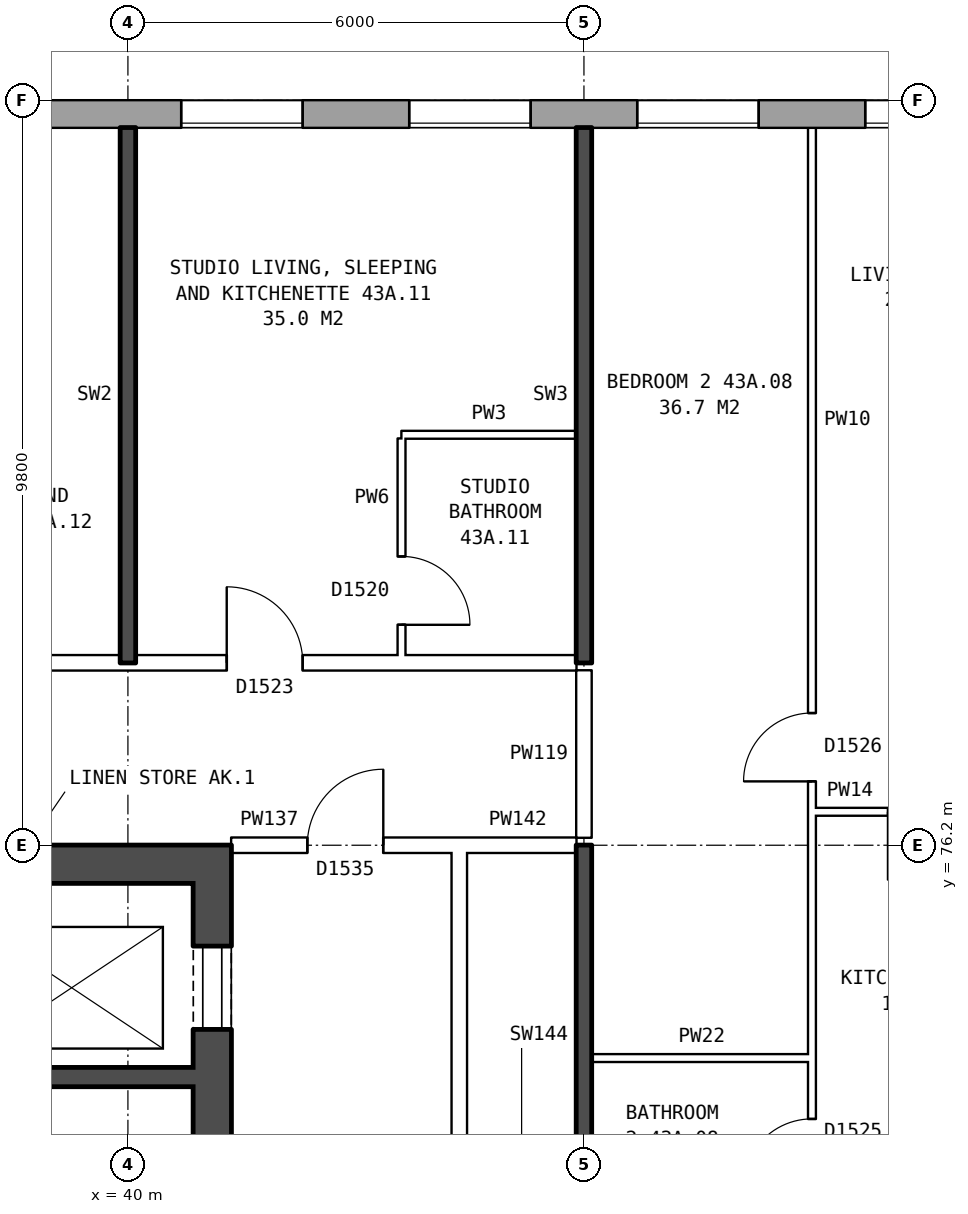
"""IFC4 building model, lengths in metres.
Left out: names, types, materials, properties, quantities, classifications, styles, units other than length and angle.
Written with IfcOpenShell. Run it as: python <this file> out.ifc"""

import sys

from ifc_helpers import new_model, si_unit, direction, frame, frame_2d, origin, place, context, subcontext, project, spatial, rectangle, extrude, element, fill, save


model = new_model("IFC4")
c1 = context("Model", 3, precision=1e-05, world=origin(), true_north=direction((0.0, 1.0)))
c2 = subcontext(c1, "Body", "Model", "MODEL_VIEW")
j1 = project(units=[si_unit("LENGTHUNIT", "METRE"), si_unit("PLANEANGLEUNIT", "RADIAN")], contexts=[c1])
p1 = place(None, origin())
s1 = spatial("IfcSite", under=j1, at=p1, CompositionType="ELEMENT")
p2 = place(p1, origin())
s2 = spatial("IfcBuilding", under=s1, at=p2, CompositionType="ELEMENT")
p3 = place(p2, frame((0.0, 0.0, 154.7)))
s3 = spatial("IfcBuildingStorey", under=s2, at=p3, CompositionType="ELEMENT", Elevation=154.7)
p4 = place(p3, frame((72.925, 85.82, 0.0), z_axis=(0.0, 0.0, 1.0), x_axis=(-1.0, 0.0, 0.0)))
e1 = element("IfcWall", 1, at=p4, inside=s3, PredefinedType="STANDARD", context=c2, shape_type="SweptSolid", body=[
    extrude(rectangle(XDim=41.351, YDim=0.36, at=frame_2d((20.675, 0.0))), origin(), (0.0, 0.0, 1.0), 2.85),
])
p5 = place(p4, frame((0.625, 0.0, 0.8)))
e2 = element("IfcOpeningElement", 2, at=p5, cuts=e1, PredefinedType="OPENING", context=c2, shape_type="SweptSolid", body=[
    extrude(rectangle(XDim=1.6, YDim=1.8, at=frame_2d((0.8, 0.9))), frame((0.0, 0.19, 0.0), z_axis=(0.0, -1.0, 0.0), x_axis=(1.0, 0.0, 0.0)), (0.0, 0.0, 1.0), 0.38),
])
p6 = place(p4, frame((3.625, 0.0, 0.8)))
e3 = element("IfcOpeningElement", 3, at=p6, cuts=e1, PredefinedType="OPENING", context=c2, shape_type="SweptSolid", body=[
    extrude(rectangle(XDim=1.6, YDim=1.8, at=frame_2d((0.8, 0.9))), frame((0.0, 0.19, 0.0), z_axis=(0.0, -1.0, 0.0), x_axis=(1.0, 0.0, 0.0)), (0.0, 0.0, 1.0), 0.38),
])
p7 = place(p4, frame((5.525, 0.0, 1.7)))
e4 = element("IfcOpeningElement", 4, at=p7, cuts=e1, PredefinedType="OPENING", context=c2, shape_type="SweptSolid", body=[
    extrude(rectangle(XDim=1.4, YDim=0.9, at=frame_2d((0.7, 0.45))), frame((0.0, 0.19, 0.0), z_axis=(0.0, -1.0, 0.0), x_axis=(1.0, 0.0, 0.0)), (0.0, 0.0, 1.0), 0.38),
])
p8 = place(p4, frame((9.625, 0.0, 0.8)))
e5 = element("IfcOpeningElement", 5, at=p8, cuts=e1, PredefinedType="OPENING", context=c2, shape_type="SweptSolid", body=[
    extrude(rectangle(XDim=1.6, YDim=1.8, at=frame_2d((0.8, 0.9))), frame((0.0, 0.19, 0.0), z_axis=(0.0, -1.0, 0.0), x_axis=(1.0, 0.0, 0.0)), (0.0, 0.0, 1.0), 0.38),
])
p9 = place(p4, frame((12.625, 0.0, 0.8)))
e6 = element("IfcOpeningElement", 6, at=p9, cuts=e1, PredefinedType="OPENING", context=c2, shape_type="SweptSolid", body=[
    extrude(rectangle(XDim=1.6, YDim=1.8, at=frame_2d((0.8, 0.9))), frame((0.0, 0.19, 0.0), z_axis=(0.0, -1.0, 0.0), x_axis=(1.0, 0.0, 0.0)), (0.0, 0.0, 1.0), 0.38),
])
p10 = place(p4, frame((15.625, 0.0, 0.8)))
e7 = element("IfcOpeningElement", 7, at=p10, cuts=e1, PredefinedType="OPENING", context=c2, shape_type="SweptSolid", body=[
    extrude(rectangle(XDim=1.6, YDim=1.8, at=frame_2d((0.8, 0.9))), frame((0.0, 0.19, 0.0), z_axis=(0.0, -1.0, 0.0), x_axis=(1.0, 0.0, 0.0)), (0.0, 0.0, 1.0), 0.38),
])
p11 = place(p4, frame((18.625, 0.0, 0.8)))
e8 = element("IfcOpeningElement", 8, at=p11, cuts=e1, PredefinedType="OPENING", context=c2, shape_type="SweptSolid", body=[
    extrude(rectangle(XDim=1.6, YDim=1.8, at=frame_2d((0.8, 0.9))), frame((0.0, 0.19, 0.0), z_axis=(0.0, -1.0, 0.0), x_axis=(1.0, 0.0, 0.0)), (0.0, 0.0, 1.0), 0.38),
])
p12 = place(p4, frame((21.625, 0.0, 0.8)))
e9 = element("IfcOpeningElement", 9, at=p12, cuts=e1, PredefinedType="OPENING", context=c2, shape_type="SweptSolid", body=[
    extrude(rectangle(XDim=1.6, YDim=1.8, at=frame_2d((0.8, 0.9))), frame((0.0, 0.19, 0.0), z_axis=(0.0, -1.0, 0.0), x_axis=(1.0, 0.0, 0.0)), (0.0, 0.0, 1.0), 0.38),
])
p13 = place(p4, frame((24.625, 0.0, 0.8)))
e10 = element("IfcOpeningElement", 10, at=p13, cuts=e1, PredefinedType="OPENING", context=c2, shape_type="SweptSolid", body=[
    extrude(rectangle(XDim=1.6, YDim=1.8, at=frame_2d((0.8, 0.9))), frame((0.0, 0.19, 0.0), z_axis=(0.0, -1.0, 0.0), x_axis=(1.0, 0.0, 0.0)), (0.0, 0.0, 1.0), 0.38),
])
p14 = place(p4, frame((27.625, 0.0, 0.8)))
e11 = element("IfcOpeningElement", 11, at=p14, cuts=e1, PredefinedType="OPENING", context=c2, shape_type="SweptSolid", body=[
    extrude(rectangle(XDim=1.6, YDim=1.8, at=frame_2d((0.8, 0.9))), frame((0.0, 0.19, 0.0), z_axis=(0.0, -1.0, 0.0), x_axis=(1.0, 0.0, 0.0)), (0.0, 0.0, 1.0), 0.38),
])
p15 = place(p4, frame((30.625, 0.0, 0.8)))
e12 = element("IfcOpeningElement", 12, at=p15, cuts=e1, PredefinedType="OPENING", context=c2, shape_type="SweptSolid", body=[
    extrude(rectangle(XDim=1.6, YDim=1.8, at=frame_2d((0.8, 0.9))), frame((0.0, 0.19, 0.0), z_axis=(0.0, -1.0, 0.0), x_axis=(1.0, 0.0, 0.0)), (0.0, 0.0, 1.0), 0.38),
])
p16 = place(p4, frame((34.425, 0.0, 1.7)))
e13 = element("IfcOpeningElement", 13, at=p16, cuts=e1, PredefinedType="OPENING", context=c2, shape_type="SweptSolid", body=[
    extrude(rectangle(XDim=0.6, YDim=0.9, at=frame_2d((0.3, 0.45))), frame((0.0, 0.19, 0.0), z_axis=(0.0, -1.0, 0.0), x_axis=(1.0, 0.0, 0.0)), (0.0, 0.0, 1.0), 0.38),
])
p17 = place(p4, frame((36.625, 0.0, 0.8)))
e14 = element("IfcOpeningElement", 14, at=p17, cuts=e1, PredefinedType="OPENING", context=c2, shape_type="SweptSolid", body=[
    extrude(rectangle(XDim=1.6, YDim=1.8, at=frame_2d((0.8, 0.9))), frame((0.0, 0.19, 0.0), z_axis=(0.0, -1.0, 0.0), x_axis=(1.0, 0.0, 0.0)), (0.0, 0.0, 1.0), 0.38),
])
p18 = place(p4, frame((35.325, 0.0, 1.0)))
e15 = element("IfcOpeningElement", 15, at=p18, cuts=e1, PredefinedType="OPENING", context=c2, shape_type="SweptSolid", body=[
    extrude(rectangle(XDim=1.0, YDim=1.5, at=frame_2d((0.5, 0.75))), frame((0.0, 0.19, 0.0), z_axis=(0.0, -1.0, 0.0), x_axis=(1.0, 0.0, 0.0)), (0.0, 0.0, 1.0), 0.38),
])
p19 = place(p3, frame((41.11, 76.2, 0.0), z_axis=(0.0, 0.0, 1.0), x_axis=(0.0, -1.0, 0.0)))
e16 = element("IfcWall", 16, at=p19, inside=s3, PredefinedType="SHEAR", context=c2, shape_type="SweptSolid", body=[
    extrude(rectangle(XDim=12.4, YDim=0.5, at=frame_2d((6.2, 0.0))), origin(), (0.0, 0.0, 1.0), 2.85),
])
p20 = place(p19, frame((1.325, 0.0, 0.0)))
e17 = element("IfcOpeningElement", 17, at=p20, cuts=e16, PredefinedType="OPENING", context=c2, shape_type="SweptSolid", body=[
    extrude(rectangle(XDim=1.1, YDim=2.1, at=frame_2d((0.55, 1.05))), frame((0.0, 0.26, 0.0), z_axis=(0.0, -1.0, 0.0), x_axis=(1.0, 0.0, 0.0)), (0.0, 0.0, 1.0), 0.52),
])
p21 = place(p19, frame((4.225, 0.0, 0.0)))
e18 = element("IfcOpeningElement", 18, at=p21, cuts=e16, PredefinedType="OPENING", context=c2, shape_type="SweptSolid", body=[
    extrude(rectangle(XDim=0.85, YDim=2.1, at=frame_2d((0.425, 1.05))), frame((0.0, 0.26, 0.0), z_axis=(0.0, -1.0, 0.0), x_axis=(1.0, 0.0, 0.0)), (0.0, 0.0, 1.0), 0.52),
])
p22 = place(p19, frame((7.475, 0.0, 0.0)))
e19 = element("IfcOpeningElement", 19, at=p22, cuts=e16, PredefinedType="OPENING", context=c2, shape_type="SweptSolid", body=[
    extrude(rectangle(XDim=0.85, YDim=2.1, at=frame_2d((0.425, 1.05))), frame((0.0, 0.26, 0.0), z_axis=(0.0, -1.0, 0.0), x_axis=(1.0, 0.0, 0.0)), (0.0, 0.0, 1.0), 0.52),
])
p23 = place(p19, frame((9.9, 0.0, 0.0)))
e20 = element("IfcOpeningElement", 20, at=p23, cuts=e16, PredefinedType="OPENING", context=c2, shape_type="SweptSolid", body=[
    extrude(rectangle(XDim=1.1, YDim=2.1, at=frame_2d((0.55, 1.05))), frame((0.0, 0.26, 0.0), z_axis=(0.0, -1.0, 0.0), x_axis=(1.0, 0.0, 0.0)), (0.0, 0.0, 1.0), 0.52),
])
p24 = place(p3, frame((40.86, 75.95, 0.0), z_axis=(0.0, 0.0, 1.0), x_axis=(-1.0, 0.0, 0.0)))
e21 = element("IfcWall", 21, at=p24, inside=s3, PredefinedType="SHEAR", context=c2, shape_type="SweptSolid", body=[
    extrude(rectangle(XDim=8.0, YDim=0.5, at=frame_2d((4.0, 0.0))), origin(), (0.0, 0.0, 1.0), 2.85),
])
p25 = place(p3, frame((40.86, 73.15, 0.0), z_axis=(0.0, 0.0, 1.0), x_axis=(-1.0, 0.0, 0.0)))
e22 = element("IfcWall", 22, at=p25, inside=s3, PredefinedType="SHEAR", context=c2, shape_type="SweptSolid", body=[
    extrude(rectangle(XDim=3.495, YDim=0.25, at=frame_2d((1.748, 0.0))), origin(), (0.0, 0.0, 1.0), 2.85),
])
p26 = place(p3, frame((44.36, 63.9, 0.0), z_axis=(0.0, 0.0, 1.0), x_axis=(0.0, 1.0, 0.0)))
e23 = element("IfcWall", 23, at=p26, inside=s3, PredefinedType="PARTITIONING", context=c2, shape_type="SweptSolid", body=[
    extrude(rectangle(XDim=12.2, YDim=0.2, at=frame_2d((6.1, 0.0))), origin(), (0.0, 0.0, 1.0), 2.85),
])
p27 = place(p26, frame((5.1, 0.0, 0.0)))
e24 = element("IfcOpeningElement", 24, at=p27, cuts=e23, PredefinedType="OPENING", context=c2, shape_type="SweptSolid", body=[
    extrude(rectangle(XDim=2.0, YDim=2.1, at=frame_2d((1.0, 1.05))), frame((0.0, 0.11, 0.0), z_axis=(0.0, -1.0, 0.0), x_axis=(1.0, 0.0, 0.0)), (0.0, 0.0, 1.0), 0.22),
])
p28 = place(p3, frame((46.1, 73.4, 0.0), z_axis=(0.0, 0.0, 1.0), x_axis=(1.0, 0.0, 0.0)))
e25 = element("IfcWall", 25, at=p28, inside=s3, PredefinedType="PARTITIONING", context=c2, shape_type="SweptSolid", body=[
    extrude(rectangle(XDim=2.9, YDim=0.1, at=frame_2d((1.45, 0.0))), origin(), (0.0, 0.0, 1.0), 2.85),
])
p29 = place(p3, frame((41.36, 76.2, 0.0), z_axis=(0.0, 0.0, 1.0), x_axis=(1.0, 0.0, 0.0)))
e26 = element("IfcWall", 26, at=p29, inside=s3, PredefinedType="PARTITIONING", context=c2, shape_type="SweptSolid", body=[
    extrude(rectangle(XDim=3.0, YDim=0.2, at=frame_2d((1.5, 0.0))), origin(), (0.0, 0.0, 1.0), 2.85),
])
p30 = place(p29, frame((1.0, 0.0, 0.0)))
e27 = element("IfcOpeningElement", 27, at=p30, cuts=e26, PredefinedType="OPENING", context=c2, shape_type="SweptSolid", body=[
    extrude(rectangle(XDim=1.0, YDim=2.1, at=frame_2d((0.5, 1.05))), frame((0.0, 0.11, 0.0), z_axis=(0.0, -1.0, 0.0), x_axis=(1.0, 0.0, 0.0)), (0.0, 0.0, 1.0), 0.22),
])
p31 = place(p3, frame((44.36, 76.2, 0.0), z_axis=(0.0, 0.0, 1.0), x_axis=(1.0, 0.0, 0.0)))
e28 = element("IfcWall", 28, at=p31, inside=s3, PredefinedType="PARTITIONING", context=c2, shape_type="SweptSolid", body=[
    extrude(rectangle(XDim=1.54, YDim=0.2, at=frame_2d((0.77, 0.0))), origin(), (0.0, 0.0, 1.0), 2.85),
])
p32 = place(p3, frame((49.0, 76.64, 0.0), z_axis=(0.0, 0.0, 1.0), x_axis=(1.0, 0.0, 0.0)))
e29 = element("IfcWall", 29, at=p32, inside=s3, PredefinedType="PARTITIONING", context=c2, shape_type="SweptSolid", body=[
    extrude(rectangle(XDim=2.9, YDim=0.1, at=frame_2d((1.45, 0.0))), origin(), (0.0, 0.0, 1.0), 2.85),
])
p33 = place(p32, frame((1.0, 0.0, 0.0)))
e30 = element("IfcOpeningElement", 30, at=p33, cuts=e29, PredefinedType="OPENING", context=c2, shape_type="SweptSolid", body=[
    extrude(rectangle(XDim=0.9, YDim=2.1, at=frame_2d((0.45, 1.05))), frame((0.0, 0.06, 0.0), z_axis=(0.0, -1.0, 0.0), x_axis=(1.0, 0.0, 0.0)), (0.0, 0.0, 1.0), 0.12),
])
p34 = place(p3, frame((28.86, 78.6, 0.0), z_axis=(0.0, 0.0, 1.0), x_axis=(1.0, 0.0, 0.0)))
e31 = element("IfcWall", 31, at=p34, inside=s3, PredefinedType="PARTITIONING", context=c2, shape_type="SweptSolid", body=[
    extrude(rectangle(XDim=17.04, YDim=0.2, at=frame_2d((8.52, 0.0))), origin(), (0.0, 0.0, 1.0), 2.85),
])
p35 = place(p34, frame((12.44, 0.0, 0.0)))
e32 = element("IfcOpeningElement", 32, at=p35, cuts=e31, PredefinedType="OPENING", context=c2, shape_type="SweptSolid", body=[
    extrude(rectangle(XDim=1.0, YDim=2.1, at=frame_2d((0.5, 1.05))), frame((0.0, 0.11, 0.0), z_axis=(0.0, -1.0, 0.0), x_axis=(1.0, 0.0, 0.0)), (0.0, 0.0, 1.0), 0.22),
])
p36 = place(p34, frame((7.64, 0.0, 0.0)))
e33 = element("IfcOpeningElement", 33, at=p36, cuts=e31, PredefinedType="OPENING", context=c2, shape_type="SweptSolid", body=[
    extrude(rectangle(XDim=1.0, YDim=2.1, at=frame_2d((0.5, 1.05))), frame((0.0, 0.11, 0.0), z_axis=(0.0, -1.0, 0.0), x_axis=(1.0, 0.0, 0.0)), (0.0, 0.0, 1.0), 0.22),
])
p37 = place(p3, frame((43.6, 81.6, 0.0), z_axis=(0.0, 0.0, 1.0), x_axis=(1.0, 0.0, 0.0)))
e34 = element("IfcWall", 34, at=p37, inside=s3, PredefinedType="PARTITIONING", context=c2, shape_type="SweptSolid", body=[
    extrude(rectangle(XDim=2.3, YDim=0.1, at=frame_2d((1.15, 0.0))), origin(), (0.0, 0.0, 1.0), 2.85),
])
p38 = place(p3, frame((40.0, 78.6, 0.0), z_axis=(0.0, 0.0, 1.0), x_axis=(0.0, 1.0, 0.0)))
e35 = element("IfcWall", 35, at=p38, inside=s3, PredefinedType="SOLIDWALL", context=c2, shape_type="SweptSolid", body=[
    extrude(rectangle(XDim=7.04, YDim=0.2, at=frame_2d((3.52, 0.0))), origin(), (0.0, 0.0, 1.0), 2.85),
])
p39 = place(p3, frame((43.6, 78.7, 0.0), z_axis=(0.0, 0.0, 1.0), x_axis=(0.0, 1.0, 0.0)))
e36 = element("IfcWall", 36, at=p39, inside=s3, PredefinedType="PARTITIONING", context=c2, shape_type="SweptSolid", body=[
    extrude(rectangle(XDim=2.85, YDim=0.1, at=frame_2d((1.425, 0.0))), origin(), (0.0, 0.0, 1.0), 2.85),
])
p40 = place(p39, frame((0.4, 0.0, 0.0)))
e37 = element("IfcOpeningElement", 37, at=p40, cuts=e36, PredefinedType="OPENING", context=c2, shape_type="SweptSolid", body=[
    extrude(rectangle(XDim=0.9, YDim=2.1, at=frame_2d((0.45, 1.05))), frame((0.0, 0.06, 0.0), z_axis=(0.0, -1.0, 0.0), x_axis=(1.0, 0.0, 0.0)), (0.0, 0.0, 1.0), 0.12),
])
p41 = place(p3, frame((46.0, 71.2, 0.0), z_axis=(0.0, 0.0, 1.0), x_axis=(0.0, 1.0, 0.0)))
e38 = element("IfcWall", 38, at=p41, inside=s3, PredefinedType="SOLIDWALL", context=c2, shape_type="SweptSolid", body=[
    extrude(rectangle(XDim=5.0, YDim=0.2, at=frame_2d((2.5, 0.0))), origin(), (0.0, 0.0, 1.0), 2.85),
])
p42 = place(p3, frame((46.0, 76.3, 0.0), z_axis=(0.0, 0.0, 1.0), x_axis=(0.0, 1.0, 0.0)))
e39 = element("IfcWall", 39, at=p42, inside=s3, PredefinedType="PARTITIONING", context=c2, shape_type="SweptSolid", body=[
    extrude(rectangle(XDim=2.2, YDim=0.2, at=frame_2d((1.1, 0.0))), origin(), (0.0, 0.0, 1.0), 2.85),
])
p43 = place(p3, frame((46.0, 78.6, 0.0), z_axis=(0.0, 0.0, 1.0), x_axis=(0.0, 1.0, 0.0)))
e40 = element("IfcWall", 40, at=p43, inside=s3, PredefinedType="SOLIDWALL", context=c2, shape_type="SweptSolid", body=[
    extrude(rectangle(XDim=7.04, YDim=0.2, at=frame_2d((3.52, 0.0))), origin(), (0.0, 0.0, 1.0), 2.85),
])
p44 = place(p3, frame((49.0, 71.3, 0.0), z_axis=(0.0, 0.0, 1.0), x_axis=(0.0, 1.0, 0.0)))
e41 = element("IfcWall", 41, at=p44, inside=s3, PredefinedType="PARTITIONING", context=c2, shape_type="SweptSolid", body=[
    extrude(rectangle(XDim=14.34, YDim=0.1, at=frame_2d((7.17, 0.0))), origin(), (0.0, 0.0, 1.0), 2.85),
])
p45 = place(p44, frame((5.74, 0.0, 0.0)))
e42 = element("IfcOpeningElement", 42, at=p45, cuts=e41, PredefinedType="OPENING", context=c2, shape_type="SweptSolid", body=[
    extrude(rectangle(XDim=0.9, YDim=2.1, at=frame_2d((0.45, 1.05))), frame((0.0, 0.06, 0.0), z_axis=(0.0, -1.0, 0.0), x_axis=(1.0, 0.0, 0.0)), (0.0, 0.0, 1.0), 0.12),
])
p46 = place(p44, frame((0.4, 0.0, 0.0)))
e43 = element("IfcOpeningElement", 43, at=p46, cuts=e41, PredefinedType="OPENING", context=c2, shape_type="SweptSolid", body=[
    extrude(rectangle(XDim=0.9, YDim=2.1, at=frame_2d((0.45, 1.05))), frame((0.0, 0.06, 0.0), z_axis=(0.0, -1.0, 0.0), x_axis=(1.0, 0.0, 0.0)), (0.0, 0.0, 1.0), 0.12),
])
p47 = place(p12, origin())
e44 = element("IfcWindow", 44, at=p47, inside=s3, PartitioningType="SINGLE_PANEL", PredefinedType="WINDOW", context=c2, shape_type="SweptSolid", body=[
    extrude(rectangle(XDim=1.6, YDim=1.8, at=frame_2d((0.8, 0.9))), frame((0.0, 0.15, 0.0), z_axis=(0.0, -1.0, 0.0), x_axis=(1.0, 0.0, 0.0)), (0.0, 0.0, 1.0), 0.06),
])
fill(e9, e44)
p48 = place(p13, origin())
e45 = element("IfcWindow", 45, at=p48, inside=s3, PartitioningType="SINGLE_PANEL", PredefinedType="WINDOW", context=c2, shape_type="SweptSolid", body=[
    extrude(rectangle(XDim=1.6, YDim=1.8, at=frame_2d((0.8, 0.9))), frame((0.0, 0.15, 0.0), z_axis=(0.0, -1.0, 0.0), x_axis=(1.0, 0.0, 0.0)), (0.0, 0.0, 1.0), 0.06),
])
fill(e10, e45)
p49 = place(p14, origin())
e46 = element("IfcWindow", 46, at=p49, inside=s3, PartitioningType="SINGLE_PANEL", PredefinedType="WINDOW", context=c2, shape_type="SweptSolid", body=[
    extrude(rectangle(XDim=1.6, YDim=1.8, at=frame_2d((0.8, 0.9))), frame((0.0, 0.15, 0.0), z_axis=(0.0, -1.0, 0.0), x_axis=(1.0, 0.0, 0.0)), (0.0, 0.0, 1.0), 0.06),
])
fill(e11, e46)
p50 = place(p15, origin())
e47 = element("IfcWindow", 47, at=p50, inside=s3, PartitioningType="SINGLE_PANEL", PredefinedType="WINDOW", context=c2, shape_type="SweptSolid", body=[
    extrude(rectangle(XDim=1.6, YDim=1.8, at=frame_2d((0.8, 0.9))), frame((0.0, 0.15, 0.0), z_axis=(0.0, -1.0, 0.0), x_axis=(1.0, 0.0, 0.0)), (0.0, 0.0, 1.0), 0.06),
])
fill(e12, e47)
p51 = place(p20, origin())
e48 = element("IfcDoor", 48, at=p51, inside=s3, OperationType="DOUBLE_DOOR_SLIDING", PredefinedType="DOOR", context=c2, shape_type="SweptSolid", body=[
    extrude(rectangle(XDim=1.1, YDim=2.1, at=frame_2d((0.55, 1.05))), frame((0.0, -0.185, 0.0), z_axis=(0.0, -1.0, 0.0), x_axis=(1.0, 0.0, 0.0)), (0.0, 0.0, 1.0), 0.05),
])
fill(e17, e48)
p52 = place(p30, origin())
e49 = element("IfcDoor", 49, at=p52, inside=s3, OperationType="SINGLE_SWING_RIGHT", PredefinedType="DOOR", context=c2, shape_type="SweptSolid", body=[
    extrude(rectangle(XDim=1.0, YDim=2.1, at=frame_2d((0.5, 1.05))), frame((0.0, 0.025, 0.0), z_axis=(0.0, -1.0, 0.0), x_axis=(1.0, 0.0, 0.0)), (0.0, 0.0, 1.0), 0.05),
])
fill(e27, e49)
p53 = place(p45, origin())
e50 = element("IfcDoor", 50, at=p53, inside=s3, OperationType="SINGLE_SWING_LEFT", PredefinedType="DOOR", context=c2, shape_type="SweptSolid", body=[
    extrude(rectangle(XDim=0.9, YDim=2.1, at=frame_2d((0.45, 1.05))), frame((0.0, 0.025, 0.0), z_axis=(0.0, -1.0, 0.0), x_axis=(1.0, 0.0, 0.0)), (0.0, 0.0, 1.0), 0.05),
])
fill(e42, e50)
p54 = place(p46, origin())
e51 = element("IfcDoor", 51, at=p54, inside=s3, OperationType="SINGLE_SWING_LEFT", PredefinedType="DOOR", context=c2, shape_type="SweptSolid", body=[
    extrude(rectangle(XDim=0.9, YDim=2.1, at=frame_2d((0.45, 1.05))), frame((0.0, 0.025, 0.0), z_axis=(0.0, -1.0, 0.0), x_axis=(1.0, 0.0, 0.0)), (0.0, 0.0, 1.0), 0.05),
])
fill(e43, e51)
p55 = place(p35, origin())
e52 = element("IfcDoor", 52, at=p55, inside=s3, OperationType="SINGLE_SWING_LEFT", PredefinedType="DOOR", context=c2, shape_type="SweptSolid", body=[
    extrude(rectangle(XDim=1.0, YDim=2.1, at=frame_2d((0.5, 1.05))), frame((0.0, 0.025, 0.0), z_axis=(0.0, -1.0, 0.0), x_axis=(1.0, 0.0, 0.0)), (0.0, 0.0, 1.0), 0.05),
])
fill(e32, e52)
p56 = place(p40, frame((0.9, 0.0, 0.0), z_axis=(0.0, 0.0, 1.0), x_axis=(-1.0, 0.0, 0.0)))
e53 = element("IfcDoor", 53, at=p56, inside=s3, OperationType="SINGLE_SWING_RIGHT", PredefinedType="DOOR", context=c2, shape_type="SweptSolid", body=[
    extrude(rectangle(XDim=0.9, YDim=2.1, at=frame_2d((0.45, 1.05))), frame((0.0, 0.025, 0.0), z_axis=(0.0, -1.0, 0.0), x_axis=(1.0, 0.0, 0.0)), (0.0, 0.0, 1.0), 0.05),
])
fill(e37, e53)
save(model, sys.argv[1])
